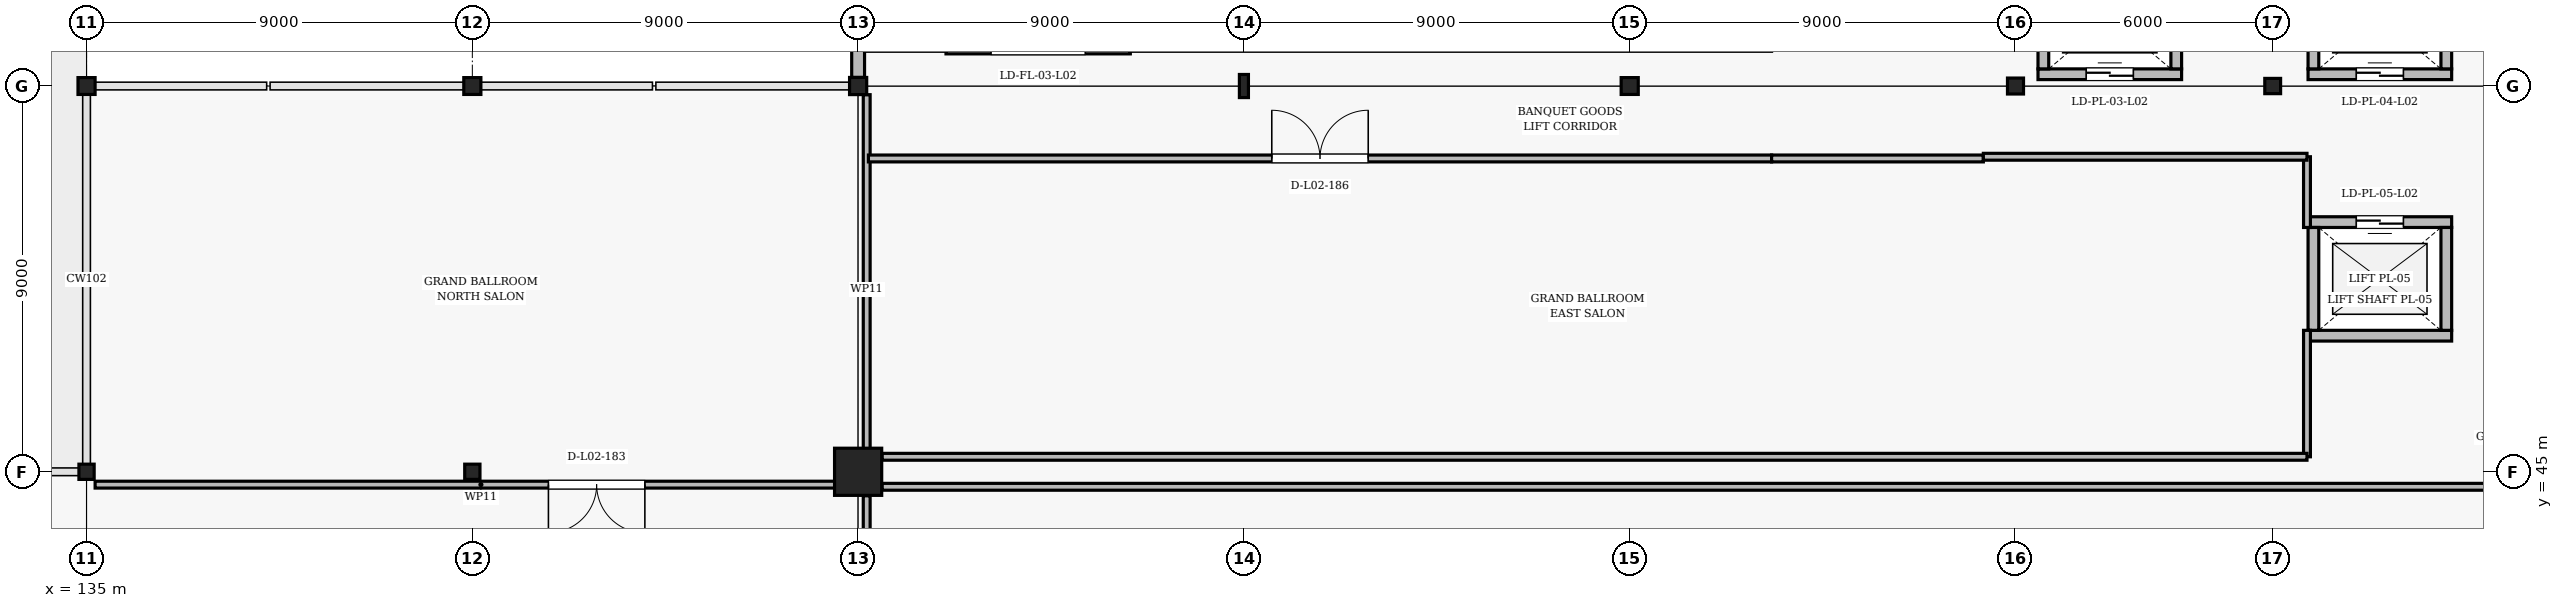
"""IFC4 building model, lengths in metres.
Left out: names, types, materials, properties, quantities, classifications, styles, units other than length and angle.
Written with IfcOpenShell. Run it as: python <this file> out.ifc"""

import sys

from ifc_helpers import new_model, si_unit, direction, frame, frame_2d, origin, origin_2d, place, context, subcontext, project, spatial, rectangle, hollow_rectangle, hollow_circle, i_section, extrude, element, fill, save


model = new_model("IFC4")
c1 = context("Model", 3, precision=1e-05, world=origin(), true_north=direction((0.0, 1.0)))
c2 = subcontext(c1, "Body", "Model", "MODEL_VIEW")
j1 = project(units=[si_unit("LENGTHUNIT", "METRE"), si_unit("PLANEANGLEUNIT", "RADIAN")], contexts=[c1])
p1 = place(None, origin())
s1 = spatial("IfcSite", under=j1, at=p1, CompositionType="ELEMENT")
p2 = place(p1, origin())
s2 = spatial("IfcBuilding", under=s1, at=p2, CompositionType="ELEMENT")
p3 = place(p2, frame((0.0, 0.0, 10.8)))
s3 = spatial("IfcBuildingStorey", under=s2, at=p3, CompositionType="ELEMENT", Elevation=10.8)
p4 = place(p3, frame((135.0, 45.0, 0.0), z_axis=(0.0, 0.0, 1.0), x_axis=(1.0, 0.0, 0.0)))
e1 = element("IfcColumn", 1, at=p4, inside=s3, PredefinedType="COLUMN", context=c2, shape_type="SweptSolid", body=[
    extrude(hollow_circle(Radius=0.178, WallThickness=0.016, at=origin_2d()), origin(), (0.0, 0.0, 1.0), 4.8),
])
p5 = place(p3, frame((135.0, 54.0, 0.0), z_axis=(0.0, 0.0, 1.0), x_axis=(1.0, 0.0, 0.0)))
e2 = element("IfcColumn", 2, at=p5, inside=s3, PredefinedType="COLUMN", context=c2, shape_type="SweptSolid", body=[
    extrude(i_section(OverallWidth=0.399, OverallDepth=0.393, WebThickness=0.023, FlangeThickness=0.037, FilletRadius=0.018, at=origin_2d()), origin(), (0.0, 0.0, 1.0), 4.62),
])
p6 = place(p3, frame((144.0, 45.0, 0.0), z_axis=(0.0, 0.0, 1.0), x_axis=(1.0, 0.0, 0.0)))
e3 = element("IfcColumn", 3, at=p6, inside=s3, PredefinedType="COLUMN", context=c2, shape_type="SweptSolid", body=[
    extrude(hollow_circle(Radius=0.178, WallThickness=0.016, at=origin_2d()), origin(), (0.0, 0.0, 1.0), 4.8),
])
p7 = place(p3, frame((144.0, 54.0, 0.0), z_axis=(0.0, 0.0, 1.0), x_axis=(1.0, 0.0, 0.0)))
e4 = element("IfcColumn", 4, at=p7, inside=s3, PredefinedType="COLUMN", context=c2, shape_type="SweptSolid", body=[
    extrude(i_section(OverallWidth=0.399, OverallDepth=0.393, WebThickness=0.023, FlangeThickness=0.037, FilletRadius=0.018, at=origin_2d()), origin(), (0.0, 0.0, 1.0), 4.62),
])
p8 = place(p3, frame((153.0, 45.0, 0.0), z_axis=(0.0, 0.0, 1.0), x_axis=(1.0, 0.0, 0.0)))
e5 = element("IfcColumn", 5, at=p8, inside=s3, PredefinedType="COLUMN", context=c2, shape_type="SweptSolid", body=[
    extrude(rectangle(XDim=1.1, YDim=1.1, at=origin_2d()), origin(), (0.0, 0.0, 1.0), 4.8),
])
p9 = place(p3, frame((153.0, 54.0, 0.0), z_axis=(0.0, 0.0, 1.0), x_axis=(1.0, 0.0, 0.0)))
e6 = element("IfcColumn", 6, at=p9, inside=s3, PredefinedType="COLUMN", context=c2, shape_type="SweptSolid", body=[
    extrude(hollow_rectangle(XDim=0.4, YDim=0.4, WallThickness=0.016, InnerFilletRadius=0.016, OuterFilletRadius=0.032, at=origin_2d()), origin(), (0.0, 0.0, 1.0), 4.8),
])
p10 = place(p3, frame((162.0, 54.0, 0.0), z_axis=(0.0, 0.0, 1.0), x_axis=(1.0, 0.0, 0.0)))
e7 = element("IfcColumn", 7, at=p10, inside=s3, PredefinedType="COLUMN", context=c2, shape_type="SweptSolid", body=[
    extrude(i_section(OverallWidth=0.211, OverallDepth=0.539, WebThickness=0.012, FlangeThickness=0.019, FilletRadius=0.014, at=origin_2d()), origin(), (0.0, 0.0, 1.0), 4.8),
])
p11 = place(p3, frame((171.0, 54.0, 0.0), z_axis=(0.0, 0.0, 1.0), x_axis=(1.0, 0.0, 0.0)))
e8 = element("IfcColumn", 8, at=p11, inside=s3, PredefinedType="COLUMN", context=c2, shape_type="SweptSolid", body=[
    extrude(i_section(OverallWidth=0.399, OverallDepth=0.393, WebThickness=0.023, FlangeThickness=0.037, FilletRadius=0.018, at=origin_2d()), origin(), (0.0, 0.0, 1.0), 4.8),
])
p12 = place(p3, frame((180.0, 54.0, 0.0), z_axis=(0.0, 0.0, 1.0), x_axis=(1.0, 0.0, 0.0)))
e9 = element("IfcColumn", 9, at=p12, inside=s3, PredefinedType="COLUMN", context=c2, shape_type="SweptSolid", body=[
    extrude(i_section(OverallWidth=0.374, OverallDepth=0.372, WebThickness=0.016, FlangeThickness=0.026, FilletRadius=0.016, at=origin_2d()), origin(), (0.0, 0.0, 1.0), 4.8),
])
p13 = place(p3, frame((186.0, 54.0, 0.0), z_axis=(0.0, 0.0, 1.0), x_axis=(1.0, 0.0, 0.0)))
e10 = element("IfcColumn", 10, at=p13, inside=s3, PredefinedType="COLUMN", context=c2, shape_type="SweptSolid", body=[
    extrude(i_section(OverallWidth=0.369, OverallDepth=0.356, WebThickness=0.011, FlangeThickness=0.018, FilletRadius=0.015, at=origin_2d()), origin(), (0.0, 0.0, 1.0), 4.8),
])
p14 = place(p3, frame((153.0, 54.2, 0.0), z_axis=(0.0, 0.0, 1.0), x_axis=(0.0, 1.0, 0.0)))
e11 = element("IfcWall", 11, at=p14, inside=s3, PredefinedType="SOLIDWALL", context=c2, shape_type="SweptSolid", body=[
    extrude(rectangle(XDim=8.453, YDim=0.3, at=frame_2d((4.226, 0.0))), origin(), (0.0, 0.0, 1.0), 3.812),
])
p15 = place(p3, frame((180.525, 54.275, 0.0), z_axis=(0.0, 0.0, 1.0), x_axis=(1.0, 0.0, 0.0)))
e12 = element("IfcWall", 12, at=p15, inside=s3, PredefinedType="SOLIDWALL", context=c2, shape_type="SweptSolid", body=[
    extrude(rectangle(XDim=3.35, YDim=0.25, at=frame_2d((1.675, 0.0))), origin(), (0.0, 0.0, 1.0), 3.974),
])
p16 = place(p15, frame((1.125, 0.0, 0.0)))
e13 = element("IfcOpeningElement", 13, at=p16, cuts=e12, PredefinedType="OPENING", context=c2, shape_type="SweptSolid", body=[
    extrude(rectangle(XDim=1.1, YDim=2.2, at=frame_2d((0.55, 1.1))), frame((0.0, 0.135, 0.0), z_axis=(0.0, -1.0, 0.0), x_axis=(1.0, 0.0, 0.0)), (0.0, 0.0, 1.0), 0.27),
])
for number, where, z_axis, x_axis in (
    (14, (180.65, 56.8, 0.0), (0.0, 0.0, 1.0), (0.0, -1.0, 0.0)),
    (15, (183.75, 54.4, 0.0), (0.0, 0.0, 1.0), (0.0, 1.0, 0.0)),
):
    element("IfcWall", number, at=place(p3, frame(where, z_axis=z_axis, x_axis=x_axis)), inside=s3, PredefinedType="SOLIDWALL", context=c2, shape_type="SweptSolid", body=[
        extrude(rectangle(XDim=2.4, YDim=0.25, at=frame_2d((1.2, 0.0))), origin(), (0.0, 0.0, 1.0), 3.974),
    ])
p17 = place(p3, frame((186.825, 54.275, 0.0), z_axis=(0.0, 0.0, 1.0), x_axis=(1.0, 0.0, 0.0)))
e16 = element("IfcWall", 16, at=p17, inside=s3, PredefinedType="SOLIDWALL", context=c2, shape_type="SweptSolid", body=[
    extrude(rectangle(XDim=3.35, YDim=0.25, at=frame_2d((1.675, 0.0))), origin(), (0.0, 0.0, 1.0), 3.812),
])
p18 = place(p17, frame((1.125, 0.0, 0.0)))
e17 = element("IfcOpeningElement", 17, at=p18, cuts=e16, PredefinedType="OPENING", context=c2, shape_type="SweptSolid", body=[
    extrude(rectangle(XDim=1.1, YDim=2.2, at=frame_2d((0.55, 1.1))), frame((0.0, 0.135, 0.0), z_axis=(0.0, -1.0, 0.0), x_axis=(1.0, 0.0, 0.0)), (0.0, 0.0, 1.0), 0.27),
])
for number, where, z_axis, x_axis in (
    (18, (186.95, 56.8, 0.0), (0.0, 0.0, 1.0), (0.0, -1.0, 0.0)),
    (19, (190.05, 54.4, 0.0), (0.0, 0.0, 1.0), (0.0, 1.0, 0.0)),
):
    element("IfcWall", number, at=place(p3, frame(where, z_axis=z_axis, x_axis=x_axis)), inside=s3, PredefinedType="SOLIDWALL", context=c2, shape_type="SweptSolid", body=[
        extrude(rectangle(XDim=2.4, YDim=0.25, at=frame_2d((1.2, 0.0))), origin(), (0.0, 0.0, 1.0), 3.812),
    ])
p19 = place(p3, frame((186.825, 48.175, 0.0), z_axis=(0.0, 0.0, 1.0), x_axis=(1.0, 0.0, 0.0)))
e20 = element("IfcWall", 20, at=p19, inside=s3, PredefinedType="SOLIDWALL", context=c2, shape_type="SweptSolid", body=[
    extrude(rectangle(XDim=3.35, YDim=0.25, at=frame_2d((1.675, 0.0))), origin(), (0.0, 0.0, 1.0), 4.128),
])
p20 = place(p3, frame((190.175, 50.825, 0.0), z_axis=(0.0, 0.0, 1.0), x_axis=(-1.0, 0.0, 0.0)))
e21 = element("IfcWall", 21, at=p20, inside=s3, PredefinedType="SOLIDWALL", context=c2, shape_type="SweptSolid", body=[
    extrude(rectangle(XDim=3.35, YDim=0.25, at=frame_2d((1.675, 0.0))), origin(), (0.0, 0.0, 1.0), 4.128),
])
p21 = place(p20, frame((1.125, 0.0, 0.0)))
e22 = element("IfcOpeningElement", 22, at=p21, cuts=e21, PredefinedType="OPENING", context=c2, shape_type="SweptSolid", body=[
    extrude(rectangle(XDim=1.1, YDim=2.2, at=frame_2d((0.55, 1.1))), frame((0.0, 0.135, 0.0), z_axis=(0.0, -1.0, 0.0), x_axis=(1.0, 0.0, 0.0)), (0.0, 0.0, 1.0), 0.27),
])
for number, where, z_axis, x_axis in (
    (23, (186.95, 50.7, 0.0), (0.0, 0.0, 1.0), (0.0, -1.0, 0.0)),
    (24, (190.05, 48.3, 0.0), (0.0, 0.0, 1.0), (0.0, 1.0, 0.0)),
):
    element("IfcWall", number, at=place(p3, frame(where, z_axis=z_axis, x_axis=x_axis)), inside=s3, PredefinedType="SOLIDWALL", context=c2, shape_type="SweptSolid", body=[
        extrude(rectangle(XDim=2.4, YDim=0.25, at=frame_2d((1.2, 0.0))), origin(), (0.0, 0.0, 1.0), 4.6),
    ])
p22 = place(p3, frame((155.05, 54.875, 0.0), z_axis=(0.0, 0.0, 1.0), x_axis=(1.0, 0.0, 0.0)))
e25 = element("IfcWall", 25, at=p22, inside=s3, PredefinedType="SOLIDWALL", context=c2, shape_type="SweptSolid", body=[
    extrude(rectangle(XDim=4.3, YDim=0.25, at=frame_2d((2.15, 0.0))), origin(), (0.0, 0.0, 1.0), 4.6),
])
p23 = place(p22, frame((1.05, 0.0, 0.0)))
e26 = element("IfcOpeningElement", 26, at=p23, cuts=e25, PredefinedType="OPENING", context=c2, shape_type="SweptSolid", body=[
    extrude(rectangle(XDim=2.2, YDim=2.5, at=frame_2d((1.1, 1.25))), frame((0.0, 0.135, 0.0), z_axis=(0.0, -1.0, 0.0), x_axis=(1.0, 0.0, 0.0)), (0.0, 0.0, 1.0), 0.27),
])
p24 = place(p3, frame((153.2, 53.798, 0.0), z_axis=(0.0, 0.0, 1.0), x_axis=(0.0, -1.0, 0.0)))
e27 = element("IfcWall", 27, at=p24, inside=s3, PredefinedType="PARTITIONING", context=c2, shape_type="SweptSolid", body=[
    extrude(rectangle(XDim=9.098, YDim=0.16, at=frame_2d((4.549, 0.0))), origin(), (0.0, 0.0, 1.0), 3.673),
])
p25 = place(p3, frame((153.2, 44.7, 0.0), z_axis=(0.0, 0.0, 1.0), x_axis=(-1.0, 0.0, 0.0)))
e28 = element("IfcWall", 28, at=p25, inside=s3, PredefinedType="PARTITIONING", context=c2, shape_type="SweptSolid", body=[
    extrude(rectangle(XDim=18.0, YDim=0.16, at=frame_2d((9.0, 0.0))), origin(), (0.0, 0.0, 1.0), 3.673),
])
p26 = place(p25, frame((5.175, 0.0, 0.0)))
e29 = element("IfcOpeningElement", 29, at=p26, cuts=e28, PredefinedType="OPENING", context=c2, shape_type="SweptSolid", body=[
    extrude(rectangle(XDim=2.25, YDim=2.4, at=frame_2d((1.125, 1.2))), frame((0.0, 0.09, 0.0), z_axis=(0.0, -1.0, 0.0), x_axis=(1.0, 0.0, 0.0)), (0.0, 0.0, 1.0), 0.18),
])
p27 = place(p3, frame((186.8, 52.35, 0.0), z_axis=(0.0, 0.0, 1.0), x_axis=(0.0, -1.0, 0.0)))
e30 = element("IfcWall", 30, at=p27, inside=s3, PredefinedType="PARTITIONING", context=c2, shape_type="SweptSolid", body=[
    extrude(rectangle(XDim=1.65, YDim=0.16, at=frame_2d((0.825, 0.0))), origin(), (0.0, 0.0, 1.0), 4.6),
])
p28 = place(p3, frame((186.8, 48.3, 0.0), z_axis=(0.0, 0.0, 1.0), x_axis=(0.0, -1.0, 0.0)))
e31 = element("IfcWall", 31, at=p28, inside=s3, PredefinedType="PARTITIONING", context=c2, shape_type="SweptSolid", body=[
    extrude(rectangle(XDim=2.95, YDim=0.16, at=frame_2d((1.475, 0.0))), origin(), (0.0, 0.0, 1.0), 3.673),
])
p29 = place(p3, frame((186.8, 45.35, 0.0), z_axis=(0.0, 0.0, 1.0), x_axis=(-1.0, 0.0, 0.0)))
e32 = element("IfcWall", 32, at=p29, inside=s3, PredefinedType="PARTITIONING", context=c2, shape_type="SweptSolid", body=[
    extrude(rectangle(XDim=33.24, YDim=0.16, at=frame_2d((16.62, 0.0))), origin(), (0.0, 0.0, 1.0), 3.673),
])
p30 = place(p3, frame((153.24, 52.31, 0.0), z_axis=(0.0, 0.0, 1.0), x_axis=(1.0, 0.0, 0.0)))
e33 = element("IfcWall", 33, at=p30, inside=s3, PredefinedType="PARTITIONING", context=c2, shape_type="SweptSolid", body=[
    extrude(rectangle(XDim=21.07, YDim=0.16, at=frame_2d((10.535, 0.0))), origin(), (0.0, 0.0, 1.0), 3.73),
])
p31 = place(p30, frame((9.41, 0.0, 0.0)))
e34 = element("IfcOpeningElement", 34, at=p31, cuts=e33, PredefinedType="OPENING", context=c2, shape_type="SweptSolid", body=[
    extrude(rectangle(XDim=2.25, YDim=2.4, at=frame_2d((1.125, 1.2))), frame((0.0, 0.09, 0.0), z_axis=(0.0, -1.0, 0.0), x_axis=(1.0, 0.0, 0.0)), (0.0, 0.0, 1.0), 0.18),
])
p32 = place(p3, frame((174.31, 52.31, 0.0), z_axis=(0.0, 0.0, 1.0), x_axis=(1.0, 0.0, 0.0)))
e35 = element("IfcWall", 35, at=p32, inside=s3, PredefinedType="PARTITIONING", context=c2, shape_type="SweptSolid", body=[
    extrude(rectangle(XDim=4.94, YDim=0.16, at=frame_2d((2.47, 0.0))), origin(), (0.0, 0.0, 1.0), 4.128),
])
p33 = place(p3, frame((179.25, 52.35, 0.0), z_axis=(0.0, 0.0, 1.0), x_axis=(1.0, 0.0, 0.0)))
e36 = element("IfcWall", 36, at=p33, inside=s3, PredefinedType="PARTITIONING", context=c2, shape_type="SweptSolid", body=[
    extrude(rectangle(XDim=7.55, YDim=0.16, at=frame_2d((3.775, 0.0))), origin(), (0.0, 0.0, 1.0), 3.73),
])
p34 = place(p3, frame((153.2, 44.44, 0.0), z_axis=(0.0, 0.0, 1.0), x_axis=(0.0, -1.0, 0.0)))
e37 = element("IfcWall", 37, at=p34, inside=s3, PredefinedType="PARTITIONING", context=c2, shape_type="SweptSolid", body=[
    extrude(rectangle(XDim=15.5, YDim=0.16, at=frame_2d((7.75, 0.0))), origin(), (0.0, 0.0, 1.0), 2.585),
])
p35 = place(p34, frame((4.3, 0.0, 0.0)))
e38 = element("IfcOpeningElement", 38, at=p35, cuts=e37, PredefinedType="OPENING", context=c2, shape_type="SweptSolid", body=[
    extrude(rectangle(XDim=2.25, YDim=2.38, at=frame_2d((1.125, 1.19))), frame((0.0, 0.09, 0.0), z_axis=(0.0, -1.0, 0.0), x_axis=(1.0, 0.0, 0.0)), (0.0, 0.0, 1.0), 0.18),
])
p36 = place(p3, frame((153.56, 44.65, 0.0), z_axis=(0.0, 0.0, 1.0), x_axis=(1.0, 0.0, 0.0)))
e39 = element("IfcWall", 39, at=p36, inside=s3, PredefinedType="PARTITIONING", context=c2, shape_type="SweptSolid", body=[
    extrude(rectangle(XDim=37.88, YDim=0.16, at=frame_2d((18.94, 0.0))), origin(), (0.0, 0.0, 1.0), 3.673),
])
p37 = place(p16, origin())
e40 = element("IfcDoor", 40, at=p37, inside=s3, OperationType="DOUBLE_DOOR_SLIDING", PredefinedType="DOOR", context=c2, shape_type="SweptSolid", body=[
    extrude(rectangle(XDim=1.1, YDim=2.2, at=frame_2d((0.55, 1.1))), frame((0.0, 0.025, 0.0), z_axis=(0.0, -1.0, 0.0), x_axis=(1.0, 0.0, 0.0)), (0.0, 0.0, 1.0), 0.05),
])
fill(e13, e40)
p38 = place(p18, origin())
e41 = element("IfcDoor", 41, at=p38, inside=s3, OperationType="DOUBLE_DOOR_SLIDING", PredefinedType="DOOR", context=c2, shape_type="SweptSolid", body=[
    extrude(rectangle(XDim=1.1, YDim=2.2, at=frame_2d((0.55, 1.1))), frame((0.0, 0.025, 0.0), z_axis=(0.0, -1.0, 0.0), x_axis=(1.0, 0.0, 0.0)), (0.0, 0.0, 1.0), 0.05),
])
fill(e17, e41)
p39 = place(p21, origin())
e42 = element("IfcDoor", 42, at=p39, inside=s3, OperationType="DOUBLE_DOOR_SLIDING", PredefinedType="DOOR", context=c2, shape_type="SweptSolid", body=[
    extrude(rectangle(XDim=1.1, YDim=2.2, at=frame_2d((0.55, 1.1))), frame((0.0, 0.025, 0.0), z_axis=(0.0, -1.0, 0.0), x_axis=(1.0, 0.0, 0.0)), (0.0, 0.0, 1.0), 0.05),
])
fill(e22, e42)
p40 = place(p26, origin())
e43 = element("IfcDoor", 43, at=p40, inside=s3, OperationType="DOUBLE_DOOR_SINGLE_SWING", PredefinedType="DOOR", context=c2, shape_type="SweptSolid", body=[
    extrude(rectangle(XDim=2.25, YDim=2.4, at=frame_2d((1.125, 1.2))), frame((0.0, 0.025, 0.0), z_axis=(0.0, -1.0, 0.0), x_axis=(1.0, 0.0, 0.0)), (0.0, 0.0, 1.0), 0.05),
])
fill(e29, e43)
p41 = place(p31, origin())
e44 = element("IfcDoor", 44, at=p41, inside=s3, OperationType="DOUBLE_DOOR_SINGLE_SWING", PredefinedType="DOOR", context=c2, shape_type="SweptSolid", body=[
    extrude(rectangle(XDim=2.25, YDim=2.4, at=frame_2d((1.125, 1.2))), frame((0.0, 0.025, 0.0), z_axis=(0.0, -1.0, 0.0), x_axis=(1.0, 0.0, 0.0)), (0.0, 0.0, 1.0), 0.05),
])
fill(e34, e44)
save(model, sys.argv[1])
